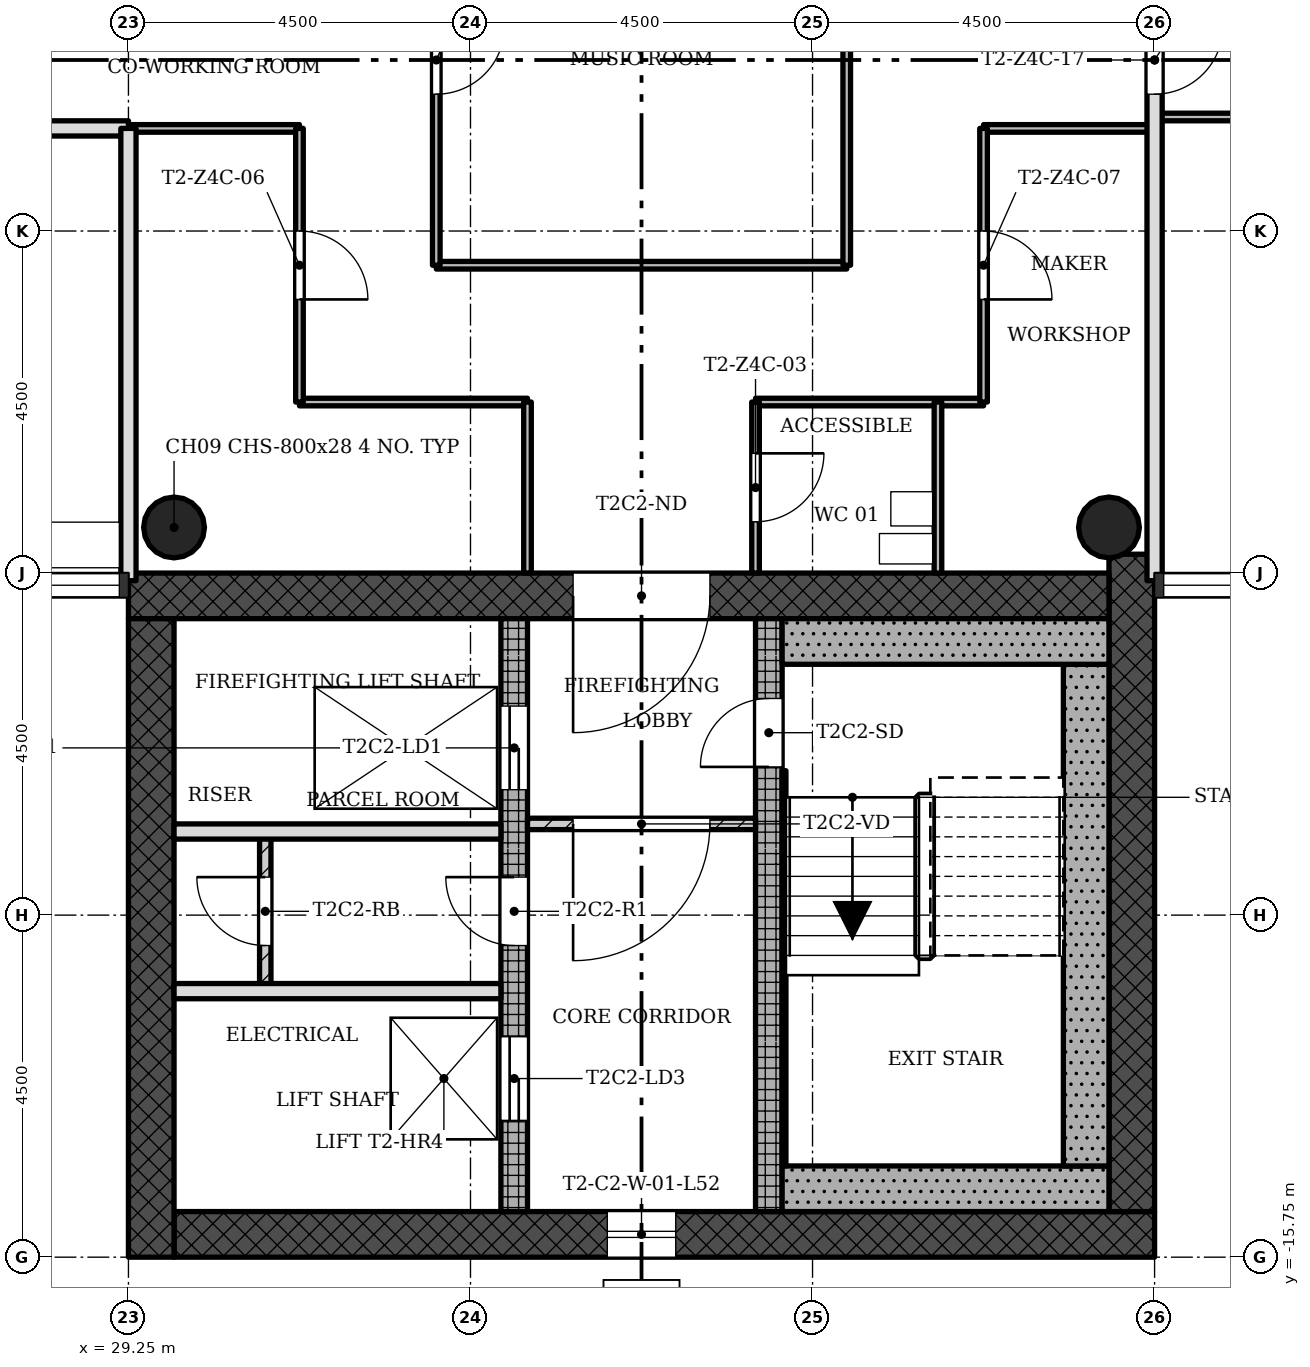
"""IFC4 building model, lengths in metres.
Left out: names, types, materials, properties, quantities, classifications, styles, units other than length and angle.
Written with IfcOpenShell. Run it as: python <this file> out.ifc"""

import sys

from ifc_helpers import new_model, si_unit, direction, frame, frame_2d, origin, origin_2d, place, context, subcontext, project, spatial, rectangle, hollow_circle, extrude, element, fill, save


model = new_model("IFC4")
c1 = context("Model", 3, precision=1e-05, world=origin(), true_north=direction((0.0, 1.0)))
c2 = subcontext(c1, "Body", "Model", "MODEL_VIEW")
j1 = project(units=[si_unit("LENGTHUNIT", "METRE"), si_unit("PLANEANGLEUNIT", "RADIAN")], contexts=[c1])
p1 = place(None, origin())
s1 = spatial("IfcSite", under=j1, at=p1, CompositionType="ELEMENT")
p2 = place(p1, origin())
s2 = spatial("IfcBuilding", under=s1, at=p2, CompositionType="ELEMENT")
p3 = place(p2, frame((0.0, 0.0, 189.2)))
s3 = spatial("IfcBuildingStorey", under=s2, at=p3, CompositionType="ELEMENT", Elevation=189.2)
p4 = place(p3, frame((29.85, -15.45, 0.0), z_axis=(0.0, 0.0, 1.0), x_axis=(1.0, 0.0, 0.0)))
e1 = element("IfcWall", 1, at=p4, inside=s3, PredefinedType="SHEAR", context=c2, shape_type="SweptSolid", body=[
    extrude(rectangle(XDim=12.9, YDim=0.6, at=frame_2d((6.45, 0.0))), origin(), (0.0, 0.0, 1.0), 3.4),
])
p5 = place(p4, frame((5.7, 0.0, 0.45)))
e2 = element("IfcOpeningElement", 2, at=p5, cuts=e1, PredefinedType="OPENING", context=c2, shape_type="SweptSolid", body=[
    extrude(rectangle(XDim=0.9, YDim=2.4, at=frame_2d((0.45, 1.2))), frame((0.0, 0.31, 0.0), z_axis=(0.0, -1.0, 0.0), x_axis=(1.0, 0.0, 0.0)), (0.0, 0.0, 1.0), 0.62),
])
p6 = place(p3, frame((42.45, -15.15, 0.0), z_axis=(0.0, 0.0, 1.0), x_axis=(0.0, 1.0, 0.0)))
e3 = element("IfcWall", 3, at=p6, inside=s3, PredefinedType="SHEAR", context=c2, shape_type="SweptSolid", body=[
    extrude(rectangle(XDim=8.648, YDim=0.6, at=frame_2d((4.324, 0.0))), origin(), (0.0, 0.0, 1.0), 3.4),
])
p7 = place(p3, frame((42.15, -7.05, 0.0), z_axis=(0.0, 0.0, 1.0), x_axis=(-1.0, 0.0, 0.0)))
e4 = element("IfcWall", 4, at=p7, inside=s3, PredefinedType="SHEAR", context=c2, shape_type="SweptSolid", body=[
    extrude(rectangle(XDim=12.9, YDim=0.6, at=frame_2d((6.45, 0.0))), origin(), (0.0, 0.0, 1.0), 3.4),
])
p8 = place(p7, frame((5.25, 0.0, 0.0)))
e5 = element("IfcOpeningElement", 5, at=p8, cuts=e4, PredefinedType="OPENING", context=c2, shape_type="SweptSolid", body=[
    extrude(rectangle(XDim=1.8, YDim=2.1, at=frame_2d((0.9, 1.05))), frame((0.0, 0.31, 0.0), z_axis=(0.0, -1.0, 0.0), x_axis=(1.0, 0.0, 0.0)), (0.0, 0.0, 1.0), 0.62),
])
p9 = place(p3, frame((29.55, -7.35, 0.0), z_axis=(0.0, 0.0, 1.0), x_axis=(0.0, -1.0, 0.0)))
e6 = element("IfcWall", 6, at=p9, inside=s3, PredefinedType="SHEAR", context=c2, shape_type="SweptSolid", body=[
    extrude(rectangle(XDim=8.4, YDim=0.6, at=frame_2d((4.2, 0.0))), origin(), (0.0, 0.0, 1.0), 3.4),
])
p10 = place(p3, frame((34.325, -15.15, 0.0), z_axis=(0.0, 0.0, 1.0), x_axis=(0.0, 1.0, 0.0)))
e7 = element("IfcWall", 7, at=p10, inside=s3, PredefinedType="SHEAR", context=c2, shape_type="SweptSolid", body=[
    extrude(rectangle(XDim=7.8, YDim=0.35, at=frame_2d((3.9, 0.0))), origin(), (0.0, 0.0, 1.0), 3.4),
])
p11 = place(p10, frame((5.55, 0.0, 0.0)))
e8 = element("IfcOpeningElement", 8, at=p11, cuts=e7, PredefinedType="OPENING", context=c2, shape_type="SweptSolid", body=[
    extrude(rectangle(XDim=1.1, YDim=2.1, at=frame_2d((0.55, 1.05))), frame((0.0, 0.185, 0.0), z_axis=(0.0, -1.0, 0.0), x_axis=(1.0, 0.0, 0.0)), (0.0, 0.0, 1.0), 0.37),
])
p12 = place(p10, frame((1.2, 0.0, 0.0)))
e9 = element("IfcOpeningElement", 9, at=p12, cuts=e7, PredefinedType="OPENING", context=c2, shape_type="SweptSolid", body=[
    extrude(rectangle(XDim=1.1, YDim=2.1, at=frame_2d((0.55, 1.05))), frame((0.0, 0.185, 0.0), z_axis=(0.0, -1.0, 0.0), x_axis=(1.0, 0.0, 0.0)), (0.0, 0.0, 1.0), 0.37),
])
p13 = place(p10, frame((3.5, 0.0, 0.0)))
e10 = element("IfcOpeningElement", 10, at=p13, cuts=e7, PredefinedType="OPENING", context=c2, shape_type="SweptSolid", body=[
    extrude(rectangle(XDim=0.9, YDim=2.1, at=frame_2d((0.45, 1.05))), frame((0.0, 0.185, 0.0), z_axis=(0.0, -1.0, 0.0), x_axis=(1.0, 0.0, 0.0)), (0.0, 0.0, 1.0), 0.37),
])
p14 = place(p3, frame((37.675, -15.15, 0.0), z_axis=(0.0, 0.0, 1.0), x_axis=(0.0, 1.0, 0.0)))
e11 = element("IfcWall", 11, at=p14, inside=s3, PredefinedType="SHEAR", context=c2, shape_type="SweptSolid", body=[
    extrude(rectangle(XDim=7.8, YDim=0.35, at=frame_2d((3.9, 0.0))), origin(), (0.0, 0.0, 1.0), 3.4),
])
p15 = place(p14, frame((5.85, 0.0, 0.0)))
e12 = element("IfcOpeningElement", 12, at=p15, cuts=e11, PredefinedType="OPENING", context=c2, shape_type="SweptSolid", body=[
    extrude(rectangle(XDim=0.9, YDim=2.1, at=frame_2d((0.45, 1.05))), frame((0.0, 0.185, 0.0), z_axis=(0.0, -1.0, 0.0), x_axis=(1.0, 0.0, 0.0)), (0.0, 0.0, 1.0), 0.37),
])
for number, where, z_axis, x_axis in (
    (13, (42.15, -6.15, 0.0), (0.0, 0.0, 1.0), (1.0, 0.0, 0.0)),
    (14, (29.85, -6.15, 0.0), (0.0, 0.0, 1.0), (1.0, 0.0, 0.0)),
):
    element("IfcColumn", number, at=place(p3, frame(where, z_axis=z_axis, x_axis=x_axis)), inside=s3, PredefinedType="COLUMN", context=c2, shape_type="SweptSolid", body=[
        extrude(hollow_circle(Radius=0.4, WallThickness=0.028, at=origin_2d()), origin(), (0.0, 0.0, 1.0), 3.4),
    ])
p16 = place(p3, frame((34.5, -10.05, 0.0), z_axis=(0.0, 0.0, 1.0), x_axis=(1.0, 0.0, 0.0)))
e15 = element("IfcWall", 15, at=p16, inside=s3, PredefinedType="PARTITIONING", context=c2, shape_type="SweptSolid", body=[
    extrude(rectangle(XDim=3.0, YDim=0.15, at=frame_2d((1.5, 0.0))), origin(), (0.0, 0.0, 1.0), 3.0),
])
p17 = place(p16, frame((0.6, 0.0, 0.0)))
e16 = element("IfcOpeningElement", 16, at=p17, cuts=e15, PredefinedType="OPENING", context=c2, shape_type="SweptSolid", body=[
    extrude(rectangle(XDim=1.8, YDim=2.1, at=frame_2d((0.9, 1.05))), frame((0.0, 0.085, 0.0), z_axis=(0.0, -1.0, 0.0), x_axis=(1.0, 0.0, 0.0)), (0.0, 0.0, 1.0), 0.17),
])
for number, where, z_axis, x_axis in (
    (17, (29.85, -12.25, 0.0), (0.0, 0.0, 1.0), (1.0, 0.0, 0.0)),
    (18, (29.85, -10.15, 0.0), (0.0, 0.0, 1.0), (1.0, 0.0, 0.0)),
):
    element("IfcWall", number, at=place(p3, frame(where, z_axis=z_axis, x_axis=x_axis)), inside=s3, PredefinedType="SOLIDWALL", context=c2, shape_type="SweptSolid", body=[
        extrude(rectangle(XDim=4.3, YDim=0.2, at=frame_2d((2.15, 0.0))), origin(), (0.0, 0.0, 1.0), 3.0),
    ])
p18 = place(p3, frame((31.05, -10.15, 0.0), z_axis=(0.0, 0.0, 1.0), x_axis=(0.0, -1.0, 0.0)))
e19 = element("IfcWall", 19, at=p18, inside=s3, PredefinedType="PARTITIONING", context=c2, shape_type="SweptSolid", body=[
    extrude(rectangle(XDim=2.1, YDim=0.15, at=frame_2d((1.05, 0.0))), origin(), (0.0, 0.0, 1.0), 3.0),
])
p19 = place(p18, frame((0.6, 0.0, 0.0)))
e20 = element("IfcOpeningElement", 20, at=p19, cuts=e19, PredefinedType="OPENING", context=c2, shape_type="SweptSolid", body=[
    extrude(rectangle(XDim=0.9, YDim=2.1, at=frame_2d((0.45, 1.05))), frame((0.0, 0.085, 0.0), z_axis=(0.0, -1.0, 0.0), x_axis=(1.0, 0.0, 0.0)), (0.0, 0.0, 1.0), 0.17),
])
for number, where, z_axis, x_axis in (
    (21, (40.5, -4.5, 0.0), (0.0, 0.0, 1.0), (-1.0, 0.0, 0.0)),
    (22, (34.5, -4.5, 0.0), (0.0, 0.0, 1.0), (-1.0, 0.0, 0.0)),
):
    element("IfcWall", number, at=place(p3, frame(where, z_axis=z_axis, x_axis=x_axis)), inside=s3, PredefinedType="PARTITIONING", context=c2, shape_type="SweptSolid", body=[
        extrude(rectangle(XDim=3.0, YDim=0.1, at=frame_2d((1.5, 0.0))), origin(), (0.0, 0.0, 1.0), 3.0),
    ])
p20 = place(p3, frame((38.7, -2.7, 0.0), z_axis=(0.0, 0.0, 1.0), x_axis=(-1.0, 0.0, 0.0)))
e23 = element("IfcWall", 23, at=p20, inside=s3, PredefinedType="PARTITIONING", context=c2, shape_type="SweptSolid", body=[
    extrude(rectangle(XDim=5.4, YDim=0.1, at=frame_2d((2.7, 0.0))), origin(), (0.0, 0.0, 1.0), 3.0),
])
for number, where, z_axis, x_axis in (
    (24, (42.75, -0.9, 0.0), (0.0, 0.0, 1.0), (-1.0, 0.0, 0.0)),
    (25, (31.5, -0.9, 0.0), (0.0, 0.0, 1.0), (-1.0, 0.0, 0.0)),
):
    element("IfcWall", number, at=place(p3, frame(where, z_axis=z_axis, x_axis=x_axis)), inside=s3, PredefinedType="PARTITIONING", context=c2, shape_type="SweptSolid", body=[
        extrude(rectangle(XDim=2.25, YDim=0.1, at=frame_2d((1.125, 0.0))), origin(), (0.0, 0.0, 1.0), 3.0),
    ])
p21 = place(p3, frame((29.25, -0.9, 0.0), z_axis=(0.0, 0.0, 1.0), x_axis=(-1.0, 0.0, 0.0)))
e26 = element("IfcWall", 26, at=p21, inside=s3, PredefinedType="SOLIDWALL", context=c2, shape_type="SweptSolid", body=[
    extrude(rectangle(XDim=1.8, YDim=0.2, at=frame_2d((0.9, 0.0))), origin(), (0.0, 0.0, 1.0), 3.0),
])
p22 = place(p3, frame((47.25, -0.75, 0.0), z_axis=(0.0, 0.0, 1.0), x_axis=(-1.0, 0.0, 0.0)))
e27 = element("IfcWall", 27, at=p22, inside=s3, PredefinedType="PARTITIONING", context=c2, shape_type="SweptSolid", body=[
    extrude(rectangle(XDim=4.5, YDim=0.1, at=frame_2d((2.25, 0.0))), origin(), (0.0, 0.0, 1.0), 3.0),
])
p23 = place(p22, frame((1.8, 0.0, 0.0)))
e28 = element("IfcOpeningElement", 28, at=p23, cuts=e27, PredefinedType="OPENING", context=c2, shape_type="SweptSolid", body=[
    extrude(rectangle(XDim=0.9, YDim=2.1, at=frame_2d((0.45, 1.05))), frame((0.0, 0.06, 0.0), z_axis=(0.0, -1.0, 0.0), x_axis=(1.0, 0.0, 0.0)), (0.0, 0.0, 1.0), 0.12),
])
p24 = place(p3, frame((42.75, -6.85, 0.0), z_axis=(0.0, 0.0, 1.0), x_axis=(0.0, 1.0, 0.0)))
e29 = element("IfcWall", 29, at=p24, inside=s3, PredefinedType="SOLIDWALL", context=c2, shape_type="SweptSolid", body=[
    extrude(rectangle(XDim=13.7, YDim=0.2, at=frame_2d((6.85, 0.0))), origin(), (0.0, 0.0, 1.0), 3.0),
])
p25 = place(p24, frame((6.4, 0.0, 0.0)))
e30 = element("IfcOpeningElement", 30, at=p25, cuts=e29, PredefinedType="OPENING", context=c2, shape_type="SweptSolid", body=[
    extrude(rectangle(XDim=0.9, YDim=2.1, at=frame_2d((0.45, 1.05))), frame((0.0, 0.11, 0.0), z_axis=(0.0, -1.0, 0.0), x_axis=(1.0, 0.0, 0.0)), (0.0, 0.0, 1.0), 0.22),
])
p26 = place(p3, frame((40.5, -4.5, 0.0), z_axis=(0.0, 0.0, 1.0), x_axis=(0.0, 1.0, 0.0)))
e31 = element("IfcWall", 31, at=p26, inside=s3, PredefinedType="PARTITIONING", context=c2, shape_type="SweptSolid", body=[
    extrude(rectangle(XDim=3.6, YDim=0.1, at=frame_2d((1.8, 0.0))), origin(), (0.0, 0.0, 1.0), 3.0),
])
p27 = place(p26, frame((1.35, 0.0, 0.0)))
e32 = element("IfcOpeningElement", 32, at=p27, cuts=e31, PredefinedType="OPENING", context=c2, shape_type="SweptSolid", body=[
    extrude(rectangle(XDim=0.9, YDim=2.1, at=frame_2d((0.45, 1.05))), frame((0.0, 0.06, 0.0), z_axis=(0.0, -1.0, 0.0), x_axis=(1.0, 0.0, 0.0)), (0.0, 0.0, 1.0), 0.12),
])
p28 = place(p3, frame((39.9, -6.75, 0.0), z_axis=(0.0, 0.0, 1.0), x_axis=(0.0, 1.0, 0.0)))
e33 = element("IfcWall", 33, at=p28, inside=s3, PredefinedType="PARTITIONING", context=c2, shape_type="SweptSolid", body=[
    extrude(rectangle(XDim=2.25, YDim=0.1, at=frame_2d((1.125, 0.0))), origin(), (0.0, 0.0, 1.0), 3.0),
])
p29 = place(p3, frame((38.7, -2.7, 0.0), z_axis=(0.0, 0.0, 1.0), x_axis=(0.0, 1.0, 0.0)))
e34 = element("IfcWall", 34, at=p29, inside=s3, PredefinedType="PARTITIONING", context=c2, shape_type="SweptSolid", body=[
    extrude(rectangle(XDim=5.4, YDim=0.1, at=frame_2d((2.7, 0.0))), origin(), (0.0, 0.0, 1.0), 3.0),
])
p30 = place(p3, frame((37.5, -6.75, 0.0), z_axis=(0.0, 0.0, 1.0), x_axis=(0.0, 1.0, 0.0)))
e35 = element("IfcWall", 35, at=p30, inside=s3, PredefinedType="PARTITIONING", context=c2, shape_type="SweptSolid", body=[
    extrude(rectangle(XDim=2.25, YDim=0.1, at=frame_2d((1.125, 0.0))), origin(), (0.0, 0.0, 1.0), 3.0),
])
p31 = place(p30, frame((0.675, 0.0, 0.0)))
e36 = element("IfcOpeningElement", 36, at=p31, cuts=e35, PredefinedType="OPENING", context=c2, shape_type="SweptSolid", body=[
    extrude(rectangle(XDim=0.9, YDim=2.1, at=frame_2d((0.45, 1.05))), frame((0.0, 0.06, 0.0), z_axis=(0.0, -1.0, 0.0), x_axis=(1.0, 0.0, 0.0)), (0.0, 0.0, 1.0), 0.12),
])
p32 = place(p3, frame((34.5, -6.75, 0.0), z_axis=(0.0, 0.0, 1.0), x_axis=(0.0, 1.0, 0.0)))
e37 = element("IfcWall", 37, at=p32, inside=s3, PredefinedType="PARTITIONING", context=c2, shape_type="SweptSolid", body=[
    extrude(rectangle(XDim=2.25, YDim=0.1, at=frame_2d((1.125, 0.0))), origin(), (0.0, 0.0, 1.0), 3.0),
])
p33 = place(p3, frame((33.3, -2.7, 0.0), z_axis=(0.0, 0.0, 1.0), x_axis=(0.0, 1.0, 0.0)))
e38 = element("IfcWall", 38, at=p33, inside=s3, PredefinedType="PARTITIONING", context=c2, shape_type="SweptSolid", body=[
    extrude(rectangle(XDim=5.4, YDim=0.1, at=frame_2d((2.7, 0.0))), origin(), (0.0, 0.0, 1.0), 3.0),
])
p34 = place(p33, frame((2.25, 0.0, 0.0)))
e39 = element("IfcOpeningElement", 39, at=p34, cuts=e38, PredefinedType="OPENING", context=c2, shape_type="SweptSolid", body=[
    extrude(rectangle(XDim=0.9, YDim=2.1, at=frame_2d((0.45, 1.05))), frame((0.0, 0.06, 0.0), z_axis=(0.0, -1.0, 0.0), x_axis=(1.0, 0.0, 0.0)), (0.0, 0.0, 1.0), 0.12),
])
p35 = place(p3, frame((31.5, -4.5, 0.0), z_axis=(0.0, 0.0, 1.0), x_axis=(0.0, 1.0, 0.0)))
e40 = element("IfcWall", 40, at=p35, inside=s3, PredefinedType="PARTITIONING", context=c2, shape_type="SweptSolid", body=[
    extrude(rectangle(XDim=3.6, YDim=0.1, at=frame_2d((1.8, 0.0))), origin(), (0.0, 0.0, 1.0), 3.0),
])
p36 = place(p35, frame((1.35, 0.0, 0.0)))
e41 = element("IfcOpeningElement", 41, at=p36, cuts=e40, PredefinedType="OPENING", context=c2, shape_type="SweptSolid", body=[
    extrude(rectangle(XDim=0.9, YDim=2.1, at=frame_2d((0.45, 1.05))), frame((0.0, 0.06, 0.0), z_axis=(0.0, -1.0, 0.0), x_axis=(1.0, 0.0, 0.0)), (0.0, 0.0, 1.0), 0.12),
])
p37 = place(p3, frame((29.25, -6.85, 0.0), z_axis=(0.0, 0.0, 1.0), x_axis=(0.0, 1.0, 0.0)))
e42 = element("IfcWall", 42, at=p37, inside=s3, PredefinedType="SOLIDWALL", context=c2, shape_type="SweptSolid", body=[
    extrude(rectangle(XDim=5.95, YDim=0.2, at=frame_2d((2.975, 0.0))), origin(), (0.0, 0.0, 1.0), 3.0),
])
p38 = place(p3, frame((37.85, -14.85, 0.0), z_axis=(0.0, 0.0, 1.0), x_axis=(1.0, 0.0, 0.0)))
e43 = element("IfcWall", 43, at=p38, inside=s3, PredefinedType="SHEAR", context=c2, shape_type="SweptSolid", body=[
    extrude(rectangle(XDim=4.3, YDim=0.6, at=frame_2d((2.15, 0.0))), origin(), (0.0, 0.0, 1.0), 3.4),
])
p39 = place(p3, frame((41.85, -7.95, 0.0), z_axis=(0.0, 0.0, 1.0), x_axis=(0.0, -1.0, 0.0)))
e44 = element("IfcWall", 44, at=p39, inside=s3, PredefinedType="SHEAR", context=c2, shape_type="SweptSolid", body=[
    extrude(rectangle(XDim=6.6, YDim=0.6, at=frame_2d((3.3, 0.0))), origin(), (0.0, 0.0, 1.0), 3.4),
])
p40 = place(p3, frame((37.85, -7.65, 0.0), z_axis=(0.0, 0.0, 1.0), x_axis=(1.0, 0.0, 0.0)))
e45 = element("IfcWall", 45, at=p40, inside=s3, PredefinedType="SHEAR", context=c2, shape_type="SweptSolid", body=[
    extrude(rectangle(XDim=4.3, YDim=0.6, at=frame_2d((2.15, 0.0))), origin(), (0.0, 0.0, 1.0), 3.4),
])
p41 = place(p3, frame((37.875, -9.35, 0.0), z_axis=(0.0, 0.0, 1.0), x_axis=(0.0, -1.0, 0.0)))
e46 = element("IfcWall", 46, at=p41, inside=s3, PredefinedType="SHEAR", context=c2, shape_type="SweptSolid", body=[
    extrude(rectangle(XDim=5.2, YDim=0.05, at=frame_2d((2.6, 0.0))), origin(), (0.0, 0.0, 1.0), 3.4),
])
p42 = place(p5, origin())
e47 = element("IfcWindow", 47, at=p42, inside=s3, PartitioningType="SINGLE_PANEL", PredefinedType="WINDOW", context=c2, shape_type="SweptSolid", body=[
    extrude(rectangle(XDim=0.9, YDim=2.4, at=frame_2d((0.45, 1.2))), frame((0.0, 0.03, 0.0), z_axis=(0.0, -1.0, 0.0), x_axis=(1.0, 0.0, 0.0)), (0.0, 0.0, 1.0), 0.06),
])
fill(e2, e47)
p43 = place(p17, origin())
e48 = element("IfcDoor", 48, at=p43, inside=s3, OperationType="SINGLE_SWING_LEFT", PredefinedType="DOOR", context=c2, shape_type="SweptSolid", body=[
    extrude(rectangle(XDim=1.8, YDim=2.1, at=frame_2d((0.9, 1.05))), frame((0.0, 0.025, 0.0), z_axis=(0.0, -1.0, 0.0), x_axis=(1.0, 0.0, 0.0)), (0.0, 0.0, 1.0), 0.05),
])
fill(e16, e48)
p44 = place(p19, origin())
e49 = element("IfcDoor", 49, at=p44, inside=s3, OperationType="SINGLE_SWING_LEFT", PredefinedType="DOOR", context=c2, shape_type="SweptSolid", body=[
    extrude(rectangle(XDim=0.9, YDim=2.1, at=frame_2d((0.45, 1.05))), frame((0.0, 0.025, 0.0), z_axis=(0.0, -1.0, 0.0), x_axis=(1.0, 0.0, 0.0)), (0.0, 0.0, 1.0), 0.05),
])
fill(e20, e49)
p45 = place(p34, origin())
e50 = element("IfcDoor", 50, at=p45, inside=s3, OperationType="SINGLE_SWING_RIGHT", PredefinedType="DOOR", context=c2, shape_type="SweptSolid", body=[
    extrude(rectangle(XDim=0.9, YDim=2.1, at=frame_2d((0.45, 1.05))), frame((0.0, 0.025, 0.0), z_axis=(0.0, -1.0, 0.0), x_axis=(1.0, 0.0, 0.0)), (0.0, 0.0, 1.0), 0.05),
])
fill(e39, e50)
p46 = place(p31, origin())
e51 = element("IfcDoor", 51, at=p46, inside=s3, OperationType="SINGLE_SWING_RIGHT", PredefinedType="DOOR", context=c2, shape_type="SweptSolid", body=[
    extrude(rectangle(XDim=0.9, YDim=2.1, at=frame_2d((0.45, 1.05))), frame((0.0, 0.025, 0.0), z_axis=(0.0, -1.0, 0.0), x_axis=(1.0, 0.0, 0.0)), (0.0, 0.0, 1.0), 0.05),
])
fill(e36, e51)
p47 = place(p36, origin())
e52 = element("IfcDoor", 52, at=p47, inside=s3, OperationType="SINGLE_SWING_LEFT", PredefinedType="DOOR", context=c2, shape_type="SweptSolid", body=[
    extrude(rectangle(XDim=0.9, YDim=2.1, at=frame_2d((0.45, 1.05))), frame((0.0, 0.025, 0.0), z_axis=(0.0, -1.0, 0.0), x_axis=(1.0, 0.0, 0.0)), (0.0, 0.0, 1.0), 0.05),
])
fill(e41, e52)
p48 = place(p27, origin())
e53 = element("IfcDoor", 53, at=p48, inside=s3, OperationType="SINGLE_SWING_LEFT", PredefinedType="DOOR", context=c2, shape_type="SweptSolid", body=[
    extrude(rectangle(XDim=0.9, YDim=2.1, at=frame_2d((0.45, 1.05))), frame((0.0, 0.025, 0.0), z_axis=(0.0, -1.0, 0.0), x_axis=(1.0, 0.0, 0.0)), (0.0, 0.0, 1.0), 0.05),
])
fill(e32, e53)
p49 = place(p25, origin())
e54 = element("IfcDoor", 54, at=p49, inside=s3, OperationType="SINGLE_SWING_RIGHT", PredefinedType="DOOR", context=c2, shape_type="SweptSolid", body=[
    extrude(rectangle(XDim=0.9, YDim=2.1, at=frame_2d((0.45, 1.05))), frame((0.0, 0.025, 0.0), z_axis=(0.0, -1.0, 0.0), x_axis=(1.0, 0.0, 0.0)), (0.0, 0.0, 1.0), 0.05),
])
fill(e30, e54)
p50 = place(p15, origin())
e55 = element("IfcDoor", 55, at=p50, inside=s3, OperationType="SINGLE_SWING_RIGHT", PredefinedType="DOOR", context=c2, shape_type="SweptSolid", body=[
    extrude(rectangle(XDim=0.9, YDim=2.1, at=frame_2d((0.45, 1.05))), frame((0.0, 0.025, 0.0), z_axis=(0.0, -1.0, 0.0), x_axis=(1.0, 0.0, 0.0)), (0.0, 0.0, 1.0), 0.05),
])
fill(e12, e55)
p51 = place(p11, origin())
e56 = element("IfcDoor", 56, at=p51, inside=s3, OperationType="SLIDING_TO_LEFT", PredefinedType="DOOR", context=c2, shape_type="SweptSolid", body=[
    extrude(rectangle(XDim=1.1, YDim=2.1, at=frame_2d((0.55, 1.05))), frame((0.0, 0.025, 0.0), z_axis=(0.0, -1.0, 0.0), x_axis=(1.0, 0.0, 0.0)), (0.0, 0.0, 1.0), 0.05),
])
fill(e8, e56)
p52 = place(p12, origin())
e57 = element("IfcDoor", 57, at=p52, inside=s3, OperationType="SLIDING_TO_LEFT", PredefinedType="DOOR", context=c2, shape_type="SweptSolid", body=[
    extrude(rectangle(XDim=1.1, YDim=2.1, at=frame_2d((0.55, 1.05))), frame((0.0, 0.025, 0.0), z_axis=(0.0, -1.0, 0.0), x_axis=(1.0, 0.0, 0.0)), (0.0, 0.0, 1.0), 0.05),
])
fill(e9, e57)
p53 = place(p13, origin())
e58 = element("IfcDoor", 58, at=p53, inside=s3, OperationType="SINGLE_SWING_LEFT", PredefinedType="DOOR", context=c2, shape_type="SweptSolid", body=[
    extrude(rectangle(XDim=0.9, YDim=2.1, at=frame_2d((0.45, 1.05))), frame((0.0, 0.025, 0.0), z_axis=(0.0, -1.0, 0.0), x_axis=(1.0, 0.0, 0.0)), (0.0, 0.0, 1.0), 0.05),
])
fill(e10, e58)
p54 = place(p8, origin())
e59 = element("IfcDoor", 59, at=p54, inside=s3, OperationType="SINGLE_SWING_LEFT", PredefinedType="DOOR", context=c2, shape_type="SweptSolid", body=[
    extrude(rectangle(XDim=1.8, YDim=2.1, at=frame_2d((0.9, 1.05))), frame((0.0, 0.025, 0.0), z_axis=(0.0, -1.0, 0.0), x_axis=(1.0, 0.0, 0.0)), (0.0, 0.0, 1.0), 0.05),
])
fill(e5, e59)
save(model, sys.argv[1])
